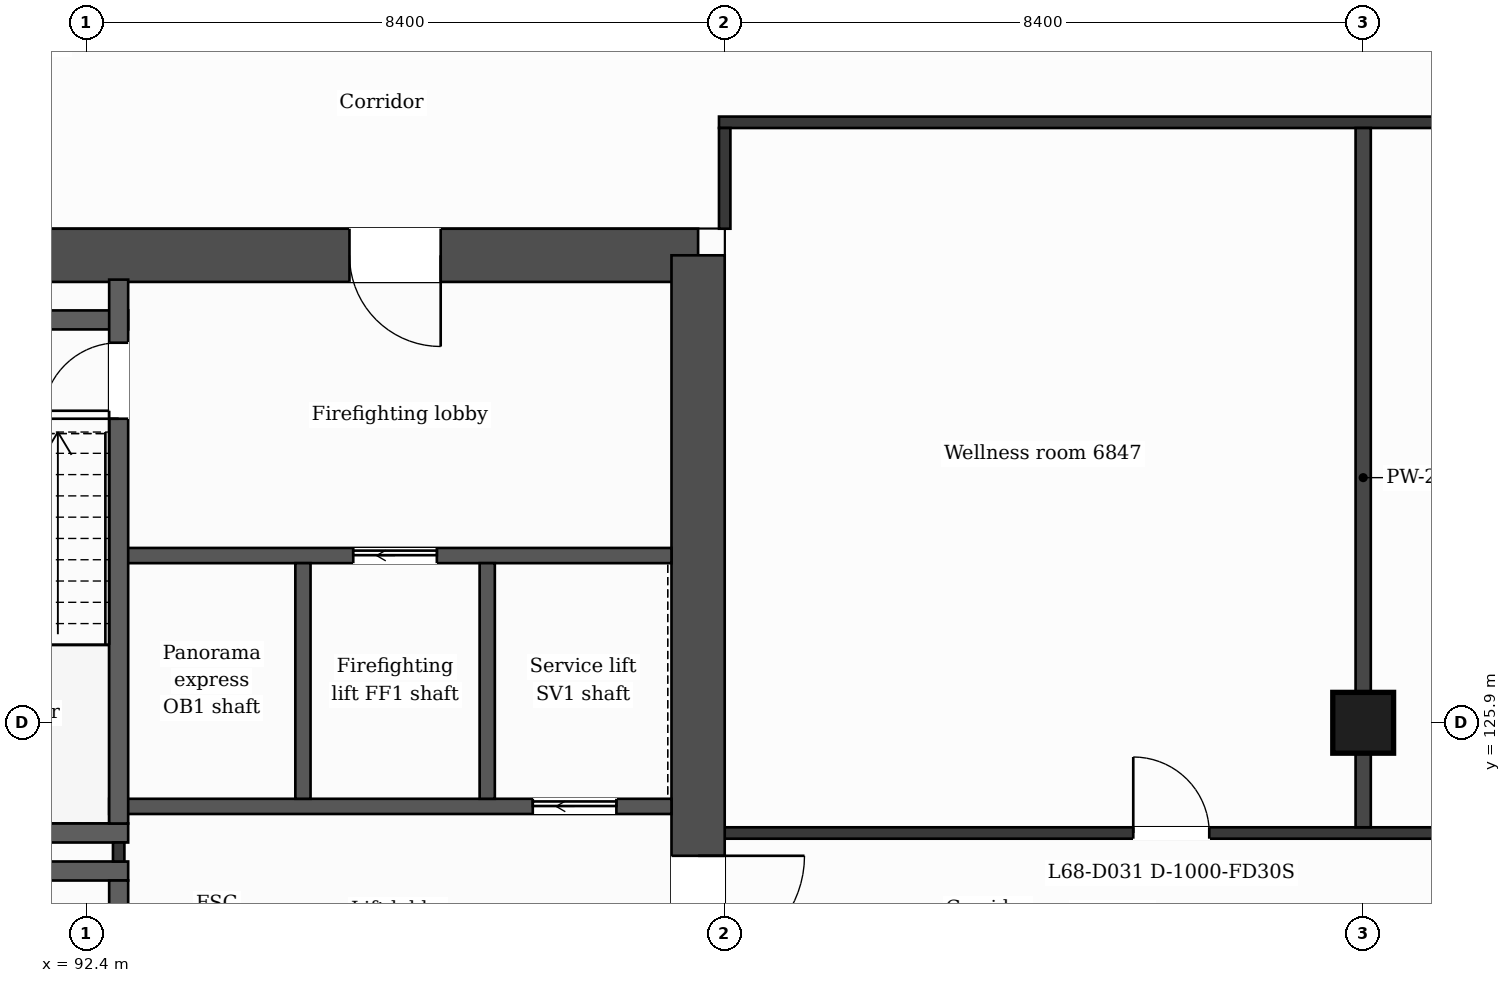
"""IFC4 building model, lengths in metres.
Left out: names, types, materials, properties, quantities, classifications, styles, units other than length and angle.
Written with IfcOpenShell. Run it as: python <this file> out.ifc"""

import sys

from ifc_helpers import new_model, si_unit, direction, frame, frame_2d, origin, origin_2d, place, context, subcontext, project, spatial, rectangle, extrude, element, fill, save


model = new_model("IFC4")
c1 = context("Model", 3, precision=1e-05, world=origin(), true_north=direction((0.0, 1.0)))
c2 = subcontext(c1, "Body", "Model", "MODEL_VIEW")
j1 = project(units=[si_unit("LENGTHUNIT", "METRE"), si_unit("PLANEANGLEUNIT", "RADIAN")], contexts=[c1])
p1 = place(None, origin())
s1 = spatial("IfcSite", under=j1, at=p1, CompositionType="ELEMENT")
p2 = place(p1, origin())
s2 = spatial("IfcBuilding", under=s1, at=p2, CompositionType="ELEMENT")
p3 = place(p2, frame((0.0, 0.0, 281.2)))
s3 = spatial("IfcBuildingStorey", under=s2, at=p3, CompositionType="ELEMENT", Elevation=281.2)
p4 = place(p3, frame((88.937, 132.05, 0.0), z_axis=(0.0, 0.0, 1.0), x_axis=(1.0, 0.0, 0.0)))
e1 = element("IfcWall", 1, at=p4, inside=s3, PredefinedType="SHEAR", context=c2, shape_type="SweptSolid", body=[
    extrude(rectangle(XDim=11.513, YDim=0.7, at=frame_2d((5.757, 0.0))), origin(), (0.0, 0.0, 1.0), 3.7),
])
p5 = place(p4, frame((6.927, 0.0, 0.0)))
e2 = element("IfcOpeningElement", 2, at=p5, cuts=e1, PredefinedType="OPENING", context=c2, shape_type="SweptSolid", body=[
    extrude(rectangle(XDim=1.2, YDim=2.1, at=frame_2d((0.6, 1.05))), frame((0.0, 0.36, 0.0), z_axis=(0.0, -1.0, 0.0), x_axis=(1.0, 0.0, 0.0)), (0.0, 0.0, 1.0), 0.72),
])
p6 = place(p3, frame((100.45, 132.05, 0.0), z_axis=(0.0, 0.0, 1.0), x_axis=(0.0, -1.0, 0.0)))
e3 = element("IfcWall", 3, at=p6, inside=s3, PredefinedType="SHEAR", context=c2, shape_type="SweptSolid", body=[
    extrude(rectangle(XDim=15.7, YDim=0.7, at=frame_2d((7.85, 0.0))), origin(), (0.0, 0.0, 1.0), 3.7),
])
p7 = place(p6, frame((7.9, 0.0, 0.0)))
e4 = element("IfcOpeningElement", 4, at=p7, cuts=e3, PredefinedType="OPENING", context=c2, shape_type="SweptSolid", body=[
    extrude(rectangle(XDim=1.4, YDim=2.1, at=frame_2d((0.7, 1.05))), frame((0.0, 0.36, 0.0), z_axis=(0.0, -1.0, 0.0), x_axis=(1.0, 0.0, 0.0)), (0.0, 0.0, 1.0), 0.72),
])
p8 = place(p3, frame((109.2, 125.9, 0.0), z_axis=(0.0, 0.0, 1.0), x_axis=(1.0, 0.0, 0.0)))
e5 = element("IfcColumn", 5, at=p8, inside=s3, PredefinedType="COLUMN", context=c2, shape_type="SweptSolid", body=[
    extrude(rectangle(XDim=0.8, YDim=0.8, at=origin_2d()), origin(), (0.0, 0.0, 1.0), 3.7),
])
for number, where, z_axis, x_axis in (
    (6, (89.552, 123.95, 0.0), (0.0, 0.0, 1.0), (1.0, 0.0, 0.0)),
    (7, (89.552, 124.45, 0.0), (0.0, 0.0, 1.0), (1.0, 0.0, 0.0)),
):
    element("IfcWall", number, at=place(p3, frame(where, z_axis=z_axis, x_axis=x_axis)), inside=s3, PredefinedType="PARTITIONING", context=c2, shape_type="SweptSolid", body=[
        extrude(rectangle(XDim=3.4, YDim=0.25, at=frame_2d((1.7, 0.0))), origin(), (0.0, 0.0, 1.0), 3.38),
    ])
p9 = place(p3, frame((100.8, 124.45, 0.0), z_axis=(0.0, 0.0, 1.0), x_axis=(1.0, 0.0, 0.0)))
e8 = element("IfcWall", 8, at=p9, inside=s3, PredefinedType="PARTITIONING", context=c2, shape_type="SweptSolid", body=[
    extrude(rectangle(XDim=25.2, YDim=0.15, at=frame_2d((12.6, 0.0))), origin(), (0.0, 0.0, 1.0), 3.38),
])
p10 = place(p9, frame((21.075, 0.0, 0.0)))
e9 = element("IfcOpeningElement", 9, at=p10, cuts=e8, PredefinedType="OPENING", context=c2, shape_type="SweptSolid", body=[
    extrude(rectangle(XDim=1.0, YDim=2.1, at=frame_2d((0.5, 1.05))), frame((0.0, 0.085, 0.0), z_axis=(0.0, -1.0, 0.0), x_axis=(1.0, 0.0, 0.0)), (0.0, 0.0, 1.0), 0.17),
])
p11 = place(p9, frame((5.375, 0.0, 0.0)))
e10 = element("IfcOpeningElement", 10, at=p11, cuts=e8, PredefinedType="OPENING", context=c2, shape_type="SweptSolid", body=[
    extrude(rectangle(XDim=1.0, YDim=2.1, at=frame_2d((0.5, 1.05))), frame((0.0, 0.085, 0.0), z_axis=(0.0, -1.0, 0.0), x_axis=(1.0, 0.0, 0.0)), (0.0, 0.0, 1.0), 0.17),
])
p12 = place(p9, frame((12.1, 0.0, 0.0)))
e11 = element("IfcOpeningElement", 11, at=p12, cuts=e8, PredefinedType="OPENING", context=c2, shape_type="SweptSolid", body=[
    extrude(rectangle(XDim=1.0, YDim=2.1, at=frame_2d((0.5, 1.05))), frame((0.0, 0.085, 0.0), z_axis=(0.0, -1.0, 0.0), x_axis=(1.0, 0.0, 0.0)), (0.0, 0.0, 1.0), 0.17),
])
p13 = place(p9, frame((17.93, 0.0, 0.0)))
e12 = element("IfcOpeningElement", 12, at=p13, cuts=e8, PredefinedType="OPENING", context=c2, shape_type="SweptSolid", body=[
    extrude(rectangle(XDim=1.0, YDim=2.1, at=frame_2d((0.5, 1.05))), frame((0.0, 0.085, 0.0), z_axis=(0.0, -1.0, 0.0), x_axis=(1.0, 0.0, 0.0)), (0.0, 0.0, 1.0), 0.17),
])
p14 = place(p3, frame((92.702, 124.8, 0.0), z_axis=(0.0, 0.0, 1.0), x_axis=(1.0, 0.0, 0.0)))
e13 = element("IfcWall", 13, at=p14, inside=s3, PredefinedType="PARTITIONING", context=c2, shape_type="SweptSolid", body=[
    extrude(rectangle(XDim=7.398, YDim=0.2, at=frame_2d((3.699, 0.0))), origin(), (0.0, 0.0, 1.0), 3.38),
])
p15 = place(p14, frame((5.573, 0.0, 0.0)))
e14 = element("IfcOpeningElement", 14, at=p15, cuts=e13, PredefinedType="OPENING", context=c2, shape_type="SweptSolid", body=[
    extrude(rectangle(XDim=1.1, YDim=2.1, at=frame_2d((0.55, 1.05))), frame((0.0, 0.11, 0.0), z_axis=(0.0, -1.0, 0.0), x_axis=(1.0, 0.0, 0.0)), (0.0, 0.0, 1.0), 0.22),
])
p16 = place(p3, frame((92.827, 128.1, 0.0), z_axis=(0.0, 0.0, 1.0), x_axis=(1.0, 0.0, 0.0)))
e15 = element("IfcWall", 15, at=p16, inside=s3, PredefinedType="PARTITIONING", context=c2, shape_type="SweptSolid", body=[
    extrude(rectangle(XDim=7.273, YDim=0.2, at=frame_2d((3.637, 0.0))), origin(), (0.0, 0.0, 1.0), 3.38),
])
p17 = place(p16, frame((3.086, 0.0, 0.0)))
e16 = element("IfcOpeningElement", 16, at=p17, cuts=e15, PredefinedType="OPENING", context=c2, shape_type="SweptSolid", body=[
    extrude(rectangle(XDim=1.1, YDim=2.1, at=frame_2d((0.55, 1.05))), frame((0.0, 0.11, 0.0), z_axis=(0.0, -1.0, 0.0), x_axis=(1.0, 0.0, 0.0)), (0.0, 0.0, 1.0), 0.22),
])
p18 = place(p3, frame((89.146, 131.2, 0.0), z_axis=(0.0, 0.0, 1.0), x_axis=(1.0, 0.0, 0.0)))
e17 = element("IfcWall", 17, at=p18, inside=s3, PredefinedType="PARTITIONING", context=c2, shape_type="SweptSolid", body=[
    extrude(rectangle(XDim=3.806, YDim=0.25, at=frame_2d((1.903, 0.0))), origin(), (0.0, 0.0, 1.0), 3.38),
])
p19 = place(p3, frame((100.725, 133.8, 0.0), z_axis=(0.0, 0.0, 1.0), x_axis=(1.0, 0.0, 0.0)))
e18 = element("IfcWall", 18, at=p19, inside=s3, PredefinedType="PARTITIONING", context=c2, shape_type="SweptSolid", body=[
    extrude(rectangle(XDim=25.35, YDim=0.15, at=frame_2d((12.675, 0.0))), origin(), (0.0, 0.0, 1.0), 3.38),
])
p20 = place(p3, frame((92.827, 124.075, 0.0), z_axis=(0.0, 0.0, 1.0), x_axis=(0.0, 1.0, 0.0)))
e19 = element("IfcWall", 19, at=p20, inside=s3, PredefinedType="PARTITIONING", context=c2, shape_type="SweptSolid", body=[
    extrude(rectangle(XDim=0.25, YDim=0.15, at=frame_2d((0.125, 0.0))), origin(), (0.0, 0.0, 1.0), 3.38),
])
p21 = place(p3, frame((92.827, 116.67, 0.0), z_axis=(0.0, 0.0, 1.0), x_axis=(0.0, 1.0, 0.0)))
e20 = element("IfcWall", 20, at=p21, inside=s3, PredefinedType="PARTITIONING", context=c2, shape_type="SweptSolid", body=[
    extrude(rectangle(XDim=7.155, YDim=0.25, at=frame_2d((3.578, 0.0))), origin(), (0.0, 0.0, 1.0), 3.38),
])
p22 = place(p21, frame((5.855, 0.0, 0.0)))
e21 = element("IfcOpeningElement", 21, at=p22, cuts=e20, PredefinedType="OPENING", context=c2, shape_type="SweptSolid", body=[
    extrude(rectangle(XDim=0.95, YDim=2.1, at=frame_2d((0.475, 1.05))), frame((0.0, 0.135, 0.0), z_axis=(0.0, -1.0, 0.0), x_axis=(1.0, 0.0, 0.0)), (0.0, 0.0, 1.0), 0.27),
])
p23 = place(p3, frame((92.827, 124.575, 0.0), z_axis=(0.0, 0.0, 1.0), x_axis=(0.0, 1.0, 0.0)))
e22 = element("IfcWall", 22, at=p23, inside=s3, PredefinedType="PARTITIONING", context=c2, shape_type="SweptSolid", body=[
    extrude(rectangle(XDim=7.155, YDim=0.25, at=frame_2d((3.578, 0.0))), origin(), (0.0, 0.0, 1.0), 3.38),
])
p24 = place(p23, frame((5.325, 0.0, 0.0)))
e23 = element("IfcOpeningElement", 23, at=p24, cuts=e22, PredefinedType="OPENING", context=c2, shape_type="SweptSolid", body=[
    extrude(rectangle(XDim=1.0, YDim=2.1, at=frame_2d((0.5, 1.05))), frame((0.0, 0.135, 0.0), z_axis=(0.0, -1.0, 0.0), x_axis=(1.0, 0.0, 0.0)), (0.0, 0.0, 1.0), 0.27),
])
for number, where, z_axis, x_axis in (
    (24, (95.251, 124.9, 0.0), (0.0, 0.0, 1.0), (0.0, 1.0, 0.0)),
    (25, (97.676, 124.9, 0.0), (0.0, 0.0, 1.0), (0.0, 1.0, 0.0)),
):
    element("IfcWall", number, at=place(p3, frame(where, z_axis=z_axis, x_axis=x_axis)), inside=s3, PredefinedType="PARTITIONING", context=c2, shape_type="SweptSolid", body=[
        extrude(rectangle(XDim=3.1, YDim=0.2, at=frame_2d((1.55, 0.0))), origin(), (0.0, 0.0, 1.0), 3.38),
    ])
p25 = place(p3, frame((100.8, 132.4, 0.0), z_axis=(0.0, 0.0, 1.0), x_axis=(0.0, 1.0, 0.0)))
e26 = element("IfcWall", 26, at=p25, inside=s3, PredefinedType="PARTITIONING", context=c2, shape_type="SweptSolid", body=[
    extrude(rectangle(XDim=1.325, YDim=0.15, at=frame_2d((0.663, 0.0))), origin(), (0.0, 0.0, 1.0), 3.38),
])
p26 = place(p3, frame((109.2, 124.525, 0.0), z_axis=(0.0, 0.0, 1.0), x_axis=(0.0, 1.0, 0.0)))
e27 = element("IfcWall", 27, at=p26, inside=s3, PredefinedType="PARTITIONING", context=c2, shape_type="SweptSolid", body=[
    extrude(rectangle(XDim=9.2, YDim=0.2, at=frame_2d((4.6, 0.0))), origin(), (0.0, 0.0, 1.0), 3.38),
])
p27 = place(p17, origin())
e28 = element("IfcDoor", 28, at=p27, inside=s3, OperationType="SLIDING_TO_LEFT", PredefinedType="DOOR", context=c2, shape_type="SweptSolid", body=[
    extrude(rectangle(XDim=1.1, YDim=2.1, at=frame_2d((0.55, 1.05))), frame((0.0, 0.025, 0.0), z_axis=(0.0, -1.0, 0.0), x_axis=(1.0, 0.0, 0.0)), (0.0, 0.0, 1.0), 0.05),
])
fill(e16, e28)
p28 = place(p15, origin())
e29 = element("IfcDoor", 29, at=p28, inside=s3, OperationType="SLIDING_TO_LEFT", PredefinedType="DOOR", context=c2, shape_type="SweptSolid", body=[
    extrude(rectangle(XDim=1.1, YDim=2.1, at=frame_2d((0.55, 1.05))), frame((0.0, 0.025, 0.0), z_axis=(0.0, -1.0, 0.0), x_axis=(1.0, 0.0, 0.0)), (0.0, 0.0, 1.0), 0.05),
])
fill(e14, e29)
p29 = place(p24, origin())
e30 = element("IfcDoor", 30, at=p29, inside=s3, OperationType="SINGLE_SWING_LEFT", PredefinedType="DOOR", context=c2, shape_type="SweptSolid", body=[
    extrude(rectangle(XDim=1.0, YDim=2.1, at=frame_2d((0.5, 1.05))), frame((0.0, 0.025, 0.0), z_axis=(0.0, -1.0, 0.0), x_axis=(1.0, 0.0, 0.0)), (0.0, 0.0, 1.0), 0.05),
])
fill(e23, e30)
p30 = place(p11, origin())
e31 = element("IfcDoor", 31, at=p30, inside=s3, OperationType="SINGLE_SWING_LEFT", PredefinedType="DOOR", context=c2, shape_type="SweptSolid", body=[
    extrude(rectangle(XDim=1.0, YDim=2.1, at=frame_2d((0.5, 1.05))), frame((0.0, 0.025, 0.0), z_axis=(0.0, -1.0, 0.0), x_axis=(1.0, 0.0, 0.0)), (0.0, 0.0, 1.0), 0.05),
])
fill(e10, e31)
p31 = place(p5, origin())
e32 = element("IfcDoor", 32, at=p31, inside=s3, OperationType="SINGLE_SWING_RIGHT", PredefinedType="DOOR", context=c2, shape_type="SweptSolid", body=[
    extrude(rectangle(XDim=1.2, YDim=2.1, at=frame_2d((0.6, 1.05))), frame((0.0, 0.025, 0.0), z_axis=(0.0, -1.0, 0.0), x_axis=(1.0, 0.0, 0.0)), (0.0, 0.0, 1.0), 0.05),
])
fill(e2, e32)
p32 = place(p7, origin())
e33 = element("IfcDoor", 33, at=p32, inside=s3, OperationType="SINGLE_SWING_LEFT", PredefinedType="DOOR", context=c2, shape_type="SweptSolid", body=[
    extrude(rectangle(XDim=1.4, YDim=2.1, at=frame_2d((0.7, 1.05))), frame((0.0, 0.025, 0.0), z_axis=(0.0, -1.0, 0.0), x_axis=(1.0, 0.0, 0.0)), (0.0, 0.0, 1.0), 0.05),
])
fill(e4, e33)
save(model, sys.argv[1])
